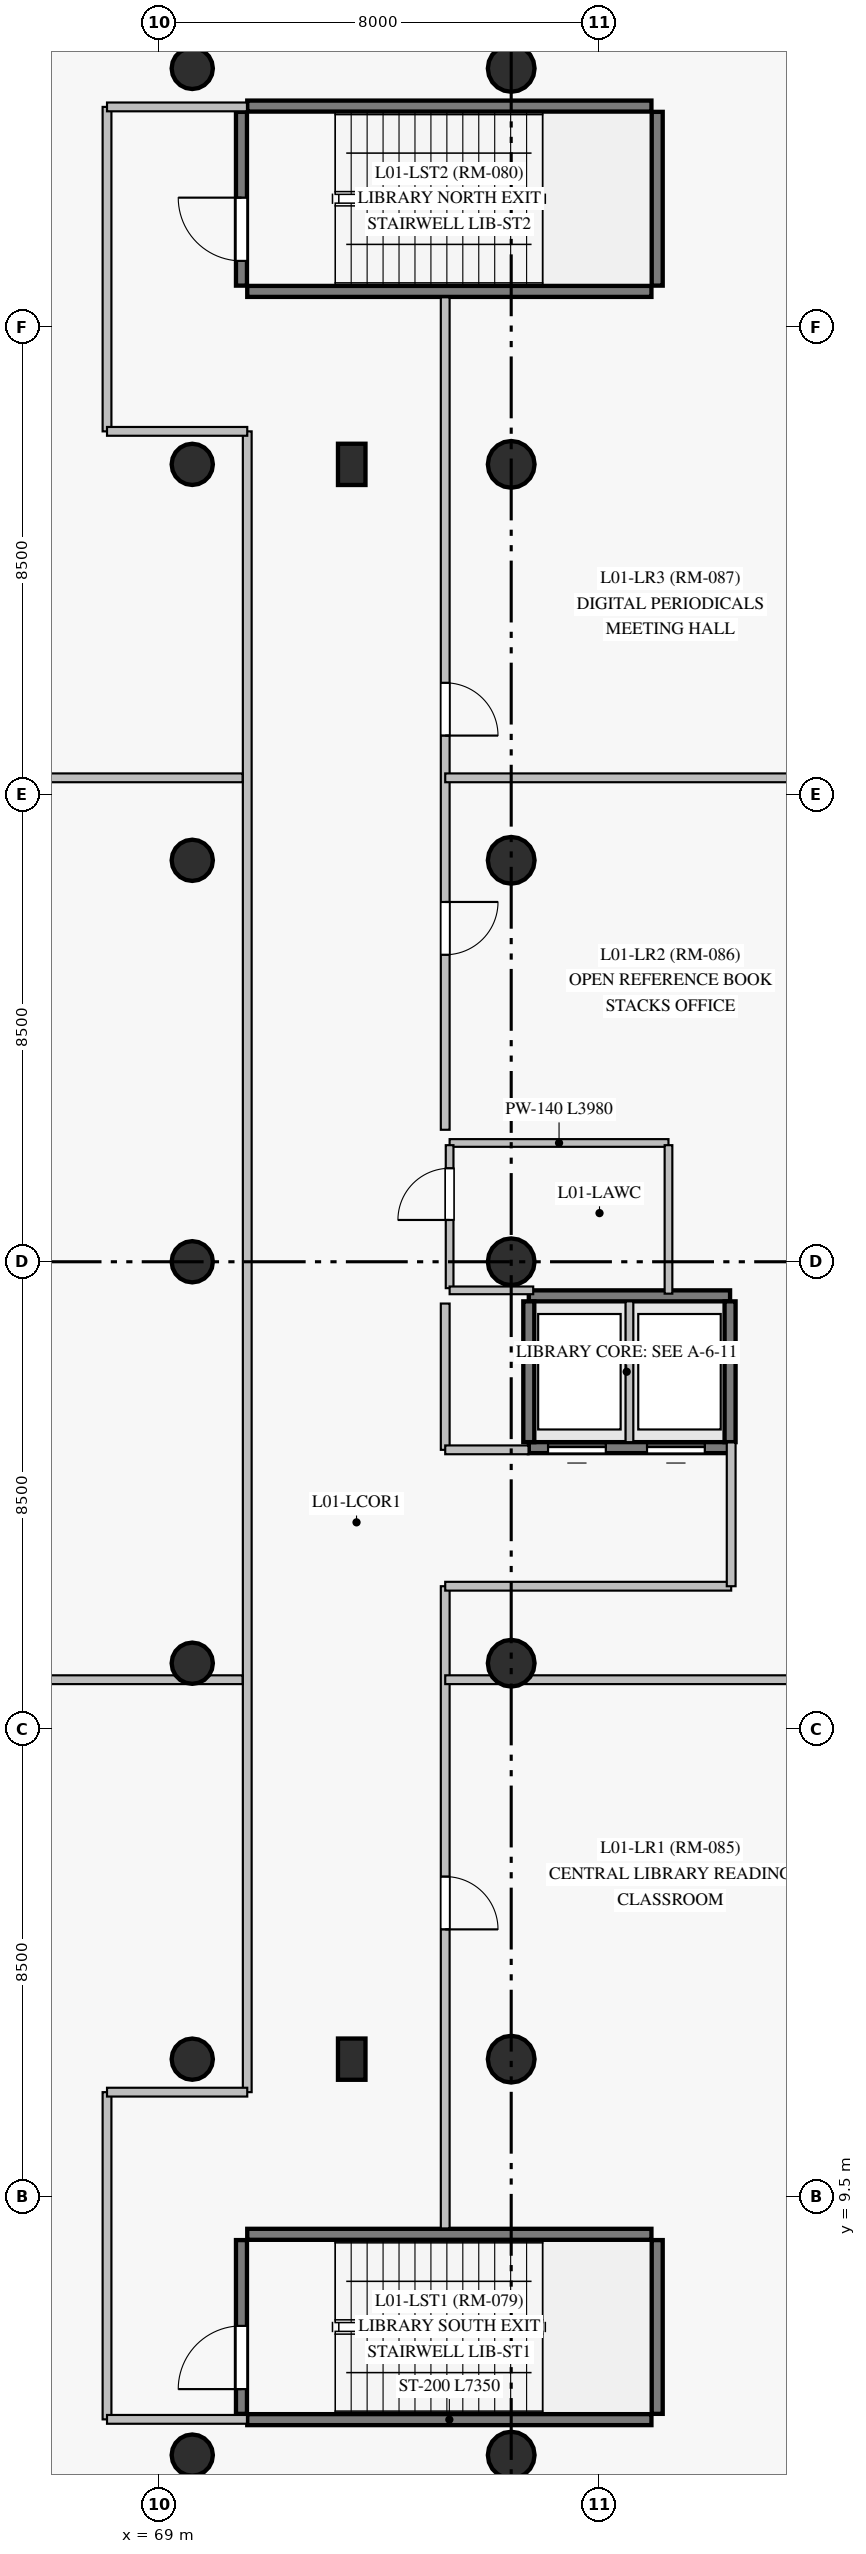
"""IFC4 building model, lengths in metres.
Left out: names, types, materials, properties, quantities, classifications, styles, units other than length and angle.
Written with IfcOpenShell. Run it as: python <this file> out.ifc"""

import sys

from ifc_helpers import new_model, si_unit, direction, frame, frame_2d, origin, origin_with_axes, origin_2d, place, context, subcontext, project, spatial, rectangle, circle, extrude, source, transform, mapped, element, fill, save


model = new_model("IFC4")
c1 = context("Model", 3, precision=1e-05, world=origin(), true_north=direction((0.0, 1.0)))
c2 = subcontext(c1, "Body", "Model", "MODEL_VIEW")
j1 = project(units=[si_unit("LENGTHUNIT", "METRE"), si_unit("PLANEANGLEUNIT", "RADIAN")], contexts=[c1])
p1 = place(None, origin())
s1 = spatial("IfcSite", under=j1, at=p1, CompositionType="ELEMENT")
p2 = place(p1, origin())
s2 = spatial("IfcBuilding", under=s1, at=p2, CompositionType="ELEMENT")
p3 = place(p2, frame((0.0, 0.0, 4.5)))
s3 = spatial("IfcBuildingStorey", under=s2, at=p3, CompositionType="ELEMENT", Elevation=4.5)
m1 = source(origin_with_axes(), c2, "Body", "SweptSolid", [
    extrude(circle(Radius=0.375, at=origin_2d()), origin(), (0.0, 0.0, 1.0), 4.5),
])
for number, where, z_axis, x_axis in (
    (1, (69.6, 4.8, 0.0), (0.0, 0.0, 1.0), (1.0, 0.0, 0.0)),
    (2, (69.6, 12.0, 0.0), (0.0, 0.0, 1.0), (1.0, 0.0, 0.0)),
    (3, (69.6, 19.2, 0.0), (0.0, 0.0, 1.0), (1.0, 0.0, 0.0)),
    (4, (69.6, 26.5, 0.0), (0.0, 0.0, 1.0), (1.0, 0.0, 0.0)),
    (5, (69.6, 33.8, 0.0), (0.0, 0.0, 1.0), (1.0, 0.0, 0.0)),
    (6, (69.6, 41.0, 0.0), (0.0, 0.0, 1.0), (1.0, 0.0, 0.0)),
    (7, (69.6, 48.2, 0.0), (0.0, 0.0, 1.0), (1.0, 0.0, 0.0)),
):
    element("IfcColumn", number, at=place(p3, frame(where, z_axis=z_axis, x_axis=x_axis)), inside=s3, PredefinedType="COLUMN", context=c2, shape_type="MappedRepresentation", body=[
        mapped(m1, transform((0.0, 0.0, 0.0), scale=1.0)),
    ])
m2 = source(origin_with_axes(), c2, "Body", "SweptSolid", [
    extrude(circle(Radius=0.425, at=origin_2d()), origin(), (0.0, 0.0, 1.0), 4.5),
])
for number, where, z_axis, x_axis in (
    (8, (75.4, 4.8, 0.0), (0.0, 0.0, 1.0), (1.0, 0.0, 0.0)),
    (9, (75.4, 12.0, 0.0), (0.0, 0.0, 1.0), (1.0, 0.0, 0.0)),
    (10, (75.4, 19.2, 0.0), (0.0, 0.0, 1.0), (1.0, 0.0, 0.0)),
    (11, (75.4, 26.5, 0.0), (0.0, 0.0, 1.0), (1.0, 0.0, 0.0)),
    (12, (75.4, 33.8, 0.0), (0.0, 0.0, 1.0), (1.0, 0.0, 0.0)),
    (13, (75.4, 41.0, 0.0), (0.0, 0.0, 1.0), (1.0, 0.0, 0.0)),
    (14, (75.4, 48.2, 0.0), (0.0, 0.0, 1.0), (1.0, 0.0, 0.0)),
):
    element("IfcColumn", number, at=place(p3, frame(where, z_axis=z_axis, x_axis=x_axis)), inside=s3, PredefinedType="COLUMN", context=c2, shape_type="MappedRepresentation", body=[
        mapped(m2, transform((0.0, 0.0, 0.0), scale=1.0)),
    ])
m3 = source(origin_with_axes(), c2, "Body", "SweptSolid", [
    extrude(rectangle(XDim=0.5, YDim=0.75, at=origin_2d()), origin(), (0.0, 0.0, 1.0), 4.5),
])
for number, where, z_axis, x_axis in (
    (15, (72.5, 12.0, 0.0), (0.0, 0.0, 1.0), (1.0, 0.0, 0.0)),
    (16, (72.5, 41.0, 0.0), (0.0, 0.0, 1.0), (1.0, 0.0, 0.0)),
):
    element("IfcColumn", number, at=place(p3, frame(where, z_axis=z_axis, x_axis=x_axis)), inside=s3, PredefinedType="PILASTER", context=c2, shape_type="MappedRepresentation", body=[
        mapped(m3, transform((0.0, 0.0, 0.0), scale=1.0)),
    ])
for number, where, z_axis, x_axis in (
    (17, (70.6, 5.445, 0.0), (0.0, 0.0, 1.0), (1.0, 0.0, 0.0)),
    (18, (70.6, 8.815, 0.0), (0.0, 0.0, 1.0), (1.0, 0.0, 0.0)),
    (19, (70.6, 44.145, 0.0), (0.0, 0.0, 1.0), (1.0, 0.0, 0.0)),
    (20, (70.6, 47.515, 0.0), (0.0, 0.0, 1.0), (1.0, 0.0, 0.0)),
):
    element("IfcWall", number, at=place(p3, frame(where, z_axis=z_axis, x_axis=x_axis)), inside=s3, PredefinedType="SHEAR", context=c2, shape_type="SweptSolid", body=[
        extrude(rectangle(XDim=7.35, YDim=0.2, at=frame_2d((3.675, 0.0))), origin(), (0.0, 0.0, 1.0), 4.2),
    ])
p4 = place(p3, frame((75.72, 23.12, 0.0), z_axis=(0.0, 0.0, 1.0), x_axis=(1.0, 0.0, 0.0)))
e21 = element("IfcWall", 21, at=p4, inside=s3, PredefinedType="SHEAR", context=c2, shape_type="SweptSolid", body=[
    extrude(rectangle(XDim=3.66, YDim=0.2, at=frame_2d((1.83, 0.0))), origin(), (0.0, 0.0, 1.0), 4.2),
])
p5 = place(p4, frame((0.35, 0.0, 0.0)))
e22 = element("IfcOpeningElement", 22, at=p5, cuts=e21, PredefinedType="OPENING", context=c2, shape_type="SweptSolid", body=[
    extrude(rectangle(XDim=1.05, YDim=2.15, at=frame_2d((0.525, 1.075))), frame((0.0, 0.11, 0.0), z_axis=(0.0, -1.0, 0.0), x_axis=(1.0, 0.0, 0.0)), (0.0, 0.0, 1.0), 0.22),
])
p6 = place(p4, frame((2.15, 0.0, 0.0)))
e23 = element("IfcOpeningElement", 23, at=p6, cuts=e21, PredefinedType="OPENING", context=c2, shape_type="SweptSolid", body=[
    extrude(rectangle(XDim=1.05, YDim=2.15, at=frame_2d((0.525, 1.075))), frame((0.0, 0.11, 0.0), z_axis=(0.0, -1.0, 0.0), x_axis=(1.0, 0.0, 0.0)), (0.0, 0.0, 1.0), 0.22),
])
p7 = place(p3, frame((75.72, 25.88, 0.0), z_axis=(0.0, 0.0, 1.0), x_axis=(1.0, 0.0, 0.0)))
e24 = element("IfcWall", 24, at=p7, inside=s3, PredefinedType="SHEAR", context=c2, shape_type="SweptSolid", body=[
    extrude(rectangle(XDim=3.66, YDim=0.2, at=frame_2d((1.83, 0.0))), origin(), (0.0, 0.0, 1.0), 4.2),
])
p8 = place(p3, frame((70.495, 5.55, 0.0), z_axis=(0.0, 0.0, 1.0), x_axis=(0.0, 1.0, 0.0)))
e25 = element("IfcWall", 25, at=p8, inside=s3, PredefinedType="SHEAR", context=c2, shape_type="SweptSolid", body=[
    extrude(rectangle(XDim=3.16, YDim=0.2, at=frame_2d((1.58, 0.0))), origin(), (0.0, 0.0, 1.0), 4.2),
])
p9 = place(p8, frame((0.45, 0.0, 0.0)))
e26 = element("IfcOpeningElement", 26, at=p9, cuts=e25, PredefinedType="OPENING", context=c2, shape_type="SweptSolid", body=[
    extrude(rectangle(XDim=1.15, YDim=2.15, at=frame_2d((0.575, 1.075))), frame((0.0, 0.11, 0.0), z_axis=(0.0, -1.0, 0.0), x_axis=(1.0, 0.0, 0.0)), (0.0, 0.0, 1.0), 0.22),
])
p10 = place(p3, frame((78.055, 5.55, 0.0), z_axis=(0.0, 0.0, 1.0), x_axis=(0.0, 1.0, 0.0)))
e27 = element("IfcWall", 27, at=p10, inside=s3, PredefinedType="SHEAR", context=c2, shape_type="SweptSolid", body=[
    extrude(rectangle(XDim=3.16, YDim=0.2, at=frame_2d((1.58, 0.0))), origin(), (0.0, 0.0, 1.0), 4.2),
])
p11 = place(p3, frame((70.495, 44.25, 0.0), z_axis=(0.0, 0.0, 1.0), x_axis=(0.0, 1.0, 0.0)))
e28 = element("IfcWall", 28, at=p11, inside=s3, PredefinedType="SHEAR", context=c2, shape_type="SweptSolid", body=[
    extrude(rectangle(XDim=3.16, YDim=0.2, at=frame_2d((1.58, 0.0))), origin(), (0.0, 0.0, 1.0), 4.2),
])
p12 = place(p11, frame((0.45, 0.0, 0.0)))
e29 = element("IfcOpeningElement", 29, at=p12, cuts=e28, PredefinedType="OPENING", context=c2, shape_type="SweptSolid", body=[
    extrude(rectangle(XDim=1.15, YDim=2.15, at=frame_2d((0.575, 1.075))), frame((0.0, 0.11, 0.0), z_axis=(0.0, -1.0, 0.0), x_axis=(1.0, 0.0, 0.0)), (0.0, 0.0, 1.0), 0.22),
])
p13 = place(p3, frame((78.055, 44.25, 0.0), z_axis=(0.0, 0.0, 1.0), x_axis=(0.0, 1.0, 0.0)))
e30 = element("IfcWall", 30, at=p13, inside=s3, PredefinedType="SHEAR", context=c2, shape_type="SweptSolid", body=[
    extrude(rectangle(XDim=3.16, YDim=0.2, at=frame_2d((1.58, 0.0))), origin(), (0.0, 0.0, 1.0), 4.2),
])
for number, where, z_axis, x_axis in (
    (31, (75.72, 23.22, 0.0), (0.0, 0.0, 1.0), (0.0, 1.0, 0.0)),
    (32, (79.38, 23.22, 0.0), (0.0, 0.0, 1.0), (0.0, 1.0, 0.0)),
):
    element("IfcWall", number, at=place(p3, frame(where, z_axis=z_axis, x_axis=x_axis)), inside=s3, PredefinedType="SHEAR", context=c2, shape_type="SweptSolid", body=[
        extrude(rectangle(XDim=2.56, YDim=0.2, at=frame_2d((1.28, 0.0))), origin(), (0.0, 0.0, 1.0), 4.2),
    ])
p14 = place(p3, frame((70.6, 11.4, 0.0), z_axis=(0.0, 0.0, 1.0), x_axis=(0.0, 1.0, 0.0)))
e33 = element("IfcWall", 33, at=p14, inside=s3, PredefinedType="PARTITIONING", context=c2, shape_type="SweptSolid", body=[
    extrude(rectangle(XDim=30.2, YDim=0.16, at=frame_2d((15.1, 0.0))), origin(), (0.0, 0.0, 1.0), 4.2),
])
p15 = place(p3, frame((74.2, 44.038, 0.0), z_axis=(0.0, 0.0, 1.0), x_axis=(0.0, -1.0, 0.0)))
e34 = element("IfcWall", 34, at=p15, inside=s3, PredefinedType="PARTITIONING", context=c2, shape_type="SweptSolid", body=[
    extrude(rectangle(XDim=15.138, YDim=0.16, at=frame_2d((7.569, 0.0))), origin(), (0.0, 0.0, 1.0), 4.2),
])
p16 = place(p15, frame((10.996, 0.0, 0.0)))
e35 = element("IfcOpeningElement", 35, at=p16, cuts=e34, PredefinedType="OPENING", context=c2, shape_type="SweptSolid", body=[
    extrude(rectangle(XDim=0.96, YDim=2.15, at=frame_2d((0.48, 1.075))), frame((0.0, 0.09, 0.0), z_axis=(0.0, -1.0, 0.0), x_axis=(1.0, 0.0, 0.0)), (0.0, 0.0, 1.0), 0.18),
])
p17 = place(p15, frame((7.01, 0.0, 0.0)))
e36 = element("IfcOpeningElement", 36, at=p17, cuts=e34, PredefinedType="OPENING", context=c2, shape_type="SweptSolid", body=[
    extrude(rectangle(XDim=0.96, YDim=2.15, at=frame_2d((0.48, 1.075))), frame((0.0, 0.09, 0.0), z_axis=(0.0, -1.0, 0.0), x_axis=(1.0, 0.0, 0.0)), (0.0, 0.0, 1.0), 0.18),
])
p18 = place(p3, frame((74.2, 20.6, 0.0), z_axis=(0.0, 0.0, 1.0), x_axis=(0.0, -1.0, 0.0)))
e37 = element("IfcWall", 37, at=p18, inside=s3, PredefinedType="PARTITIONING", context=c2, shape_type="SweptSolid", body=[
    extrude(rectangle(XDim=11.678, YDim=0.16, at=frame_2d((5.839, 0.0))), origin(), (0.0, 0.0, 1.0), 4.2),
])
p19 = place(p18, frame((5.28, 0.0, 0.0)))
e38 = element("IfcOpeningElement", 38, at=p19, cuts=e37, PredefinedType="OPENING", context=c2, shape_type="SweptSolid", body=[
    extrude(rectangle(XDim=0.96, YDim=2.15, at=frame_2d((0.48, 1.075))), frame((0.0, 0.09, 0.0), z_axis=(0.0, -1.0, 0.0), x_axis=(1.0, 0.0, 0.0)), (0.0, 0.0, 1.0), 0.18),
])
p20 = place(p3, frame((74.2, 18.9, 0.0), z_axis=(0.0, 0.0, 1.0), x_axis=(1.0, 0.0, 0.0)))
e39 = element("IfcWall", 39, at=p20, inside=s3, PredefinedType="PARTITIONING", context=c2, shape_type="SweptSolid", body=[
    extrude(rectangle(XDim=7.545, YDim=0.16, at=frame_2d((3.772, 0.0))), origin(), (0.0, 0.0, 1.0), 3.55),
])
p21 = place(p3, frame((74.2, 35.3, 0.0), z_axis=(0.0, 0.0, 1.0), x_axis=(1.0, 0.0, 0.0)))
e40 = element("IfcWall", 40, at=p21, inside=s3, PredefinedType="PARTITIONING", context=c2, shape_type="SweptSolid", body=[
    extrude(rectangle(XDim=7.545, YDim=0.16, at=frame_2d((3.772, 0.0))), origin(), (0.0, 0.0, 1.0), 4.2),
])
p22 = place(p3, frame((68.05, 5.45, 0.0), z_axis=(0.0, 0.0, 1.0), x_axis=(0.0, 1.0, 0.0)))
e41 = element("IfcWall", 41, at=p22, inside=s3, PredefinedType="PARTITIONING", context=c2, shape_type="SweptSolid", body=[
    extrude(rectangle(XDim=5.95, YDim=0.16, at=frame_2d((2.975, 0.0))), origin(), (0.0, 0.0, 1.0), 4.2),
])
p23 = place(p3, frame((68.05, 41.6, 0.0), z_axis=(0.0, 0.0, 1.0), x_axis=(0.0, 1.0, 0.0)))
e42 = element("IfcWall", 42, at=p23, inside=s3, PredefinedType="PARTITIONING", context=c2, shape_type="SweptSolid", body=[
    extrude(rectangle(XDim=5.9, YDim=0.16, at=frame_2d((2.95, 0.0))), origin(), (0.0, 0.0, 1.0), 4.2),
])
p24 = place(p3, frame((79.4, 20.6, 0.0), z_axis=(0.0, 0.0, 1.0), x_axis=(-1.0, 0.0, 0.0)))
e43 = element("IfcWall", 43, at=p24, inside=s3, PredefinedType="PARTITIONING", context=c2, shape_type="SweptSolid", body=[
    extrude(rectangle(XDim=5.2, YDim=0.16, at=frame_2d((2.6, 0.0))), origin(), (0.0, 0.0, 1.0), 4.2),
])
p25 = place(p3, frame((66.355, 18.9, 0.0), z_axis=(0.0, 0.0, 1.0), x_axis=(1.0, 0.0, 0.0)))
e44 = element("IfcWall", 44, at=p25, inside=s3, PredefinedType="PARTITIONING", context=c2, shape_type="SweptSolid", body=[
    extrude(rectangle(XDim=4.16, YDim=0.16, at=frame_2d((2.08, 0.0))), origin(), (0.0, 0.0, 1.0), 3.55),
])
p26 = place(p3, frame((66.355, 35.3, 0.0), z_axis=(0.0, 0.0, 1.0), x_axis=(1.0, 0.0, 0.0)))
e45 = element("IfcWall", 45, at=p26, inside=s3, PredefinedType="PARTITIONING", context=c2, shape_type="SweptSolid", body=[
    extrude(rectangle(XDim=4.16, YDim=0.16, at=frame_2d((2.08, 0.0))), origin(), (0.0, 0.0, 1.0), 4.2),
])
p27 = place(p3, frame((74.28, 28.66, 0.0), z_axis=(0.0, 0.0, 1.0), x_axis=(1.0, 0.0, 0.0)))
e46 = element("IfcWall", 46, at=p27, inside=s3, PredefinedType="PARTITIONING", context=c2, shape_type="SweptSolid", body=[
    extrude(rectangle(XDim=3.98, YDim=0.14, at=frame_2d((1.99, 0.0))), origin(), (0.0, 0.0, 1.0), 4.2),
])
p28 = place(p3, frame((78.26, 25.92, 0.0), z_axis=(0.0, 0.0, 1.0), x_axis=(0.0, 1.0, 0.0)))
e47 = element("IfcWall", 47, at=p28, inside=s3, PredefinedType="PARTITIONING", context=c2, shape_type="SweptSolid", body=[
    extrude(rectangle(XDim=2.7, YDim=0.14, at=frame_2d((1.35, 0.0))), origin(), (0.0, 0.0, 1.0), 4.2),
])
p29 = place(p3, frame((74.2, 25.74, 0.0), z_axis=(0.0, 0.0, 1.0), x_axis=(0.0, -1.0, 0.0)))
e48 = element("IfcWall", 48, at=p29, inside=s3, PredefinedType="PARTITIONING", context=c2, shape_type="SweptSolid", body=[
    extrude(rectangle(XDim=2.66, YDim=0.16, at=frame_2d((1.33, 0.0))), origin(), (0.0, 0.0, 1.0), 4.2),
])
p30 = place(p3, frame((74.28, 26.02, 0.0), z_axis=(0.0, 0.0, 1.0), x_axis=(0.0, 1.0, 0.0)))
e49 = element("IfcWall", 49, at=p30, inside=s3, PredefinedType="PARTITIONING", context=c2, shape_type="SweptSolid", body=[
    extrude(rectangle(XDim=2.6, YDim=0.14, at=frame_2d((1.3, 0.0))), origin(), (0.0, 0.0, 1.0), 4.2),
])
p31 = place(p30, frame((1.24, 0.0, 0.0)))
e50 = element("IfcOpeningElement", 50, at=p31, cuts=e49, PredefinedType="OPENING", context=c2, shape_type="SweptSolid", body=[
    extrude(rectangle(XDim=0.94, YDim=2.1, at=frame_2d((0.47, 1.05))), frame((0.0, 0.08, 0.0), z_axis=(0.0, -1.0, 0.0), x_axis=(1.0, 0.0, 0.0)), (0.0, 0.0, 1.0), 0.16),
])
p32 = place(p3, frame((77.55, 23.22, 0.0), z_axis=(0.0, 0.0, 1.0), x_axis=(0.0, 1.0, 0.0)))
e51 = element("IfcWall", 51, at=p32, inside=s3, PredefinedType="PARTITIONING", context=c2, shape_type="SweptSolid", body=[
    extrude(rectangle(XDim=2.56, YDim=0.14, at=frame_2d((1.28, 0.0))), origin(), (0.0, 0.0, 1.0), 4.2),
])
for number, where, z_axis, x_axis in (
    (52, (70.6, 41.6, 0.0), (0.0, 0.0, 1.0), (-1.0, 0.0, 0.0)),
    (53, (68.05, 11.4, 0.0), (0.0, 0.0, 1.0), (1.0, 0.0, 0.0)),
):
    element("IfcWall", number, at=place(p3, frame(where, z_axis=z_axis, x_axis=x_axis)), inside=s3, PredefinedType="PARTITIONING", context=c2, shape_type="SweptSolid", body=[
        extrude(rectangle(XDim=2.55, YDim=0.16, at=frame_2d((1.275, 0.0))), origin(), (0.0, 0.0, 1.0), 3.55),
    ])
p33 = place(p3, frame((79.4, 23.215, 0.0), z_axis=(0.0, 0.0, 1.0), x_axis=(0.0, -1.0, 0.0)))
e54 = element("IfcWall", 54, at=p33, inside=s3, PredefinedType="PARTITIONING", context=c2, shape_type="SweptSolid", body=[
    extrude(rectangle(XDim=2.615, YDim=0.16, at=frame_2d((1.308, 0.0))), origin(), (0.0, 0.0, 1.0), 4.2),
])
p34 = place(p3, frame((68.05, 47.5, 0.0), z_axis=(0.0, 0.0, 1.0), x_axis=(1.0, 0.0, 0.0)))
e55 = element("IfcWall", 55, at=p34, inside=s3, PredefinedType="PARTITIONING", context=c2, shape_type="SweptSolid", body=[
    extrude(rectangle(XDim=2.545, YDim=0.16, at=frame_2d((1.272, 0.0))), origin(), (0.0, 0.0, 1.0), 4.2),
])
p35 = place(p3, frame((70.595, 5.45, 0.0), z_axis=(0.0, 0.0, 1.0), x_axis=(-1.0, 0.0, 0.0)))
e56 = element("IfcWall", 56, at=p35, inside=s3, PredefinedType="PARTITIONING", context=c2, shape_type="SweptSolid", body=[
    extrude(rectangle(XDim=2.545, YDim=0.16, at=frame_2d((1.272, 0.0))), origin(), (0.0, 0.0, 1.0), 3.55),
])
p36 = place(p3, frame((74.28, 25.98, 0.0), z_axis=(0.0, 0.0, 1.0), x_axis=(1.0, 0.0, 0.0)))
e57 = element("IfcWall", 57, at=p36, inside=s3, PredefinedType="PARTITIONING", context=c2, shape_type="SweptSolid", body=[
    extrude(rectangle(XDim=1.52, YDim=0.14, at=frame_2d((0.76, 0.0))), origin(), (0.0, 0.0, 1.0), 3.55),
])
p37 = place(p3, frame((74.2, 23.08, 0.0), z_axis=(0.0, 0.0, 1.0), x_axis=(1.0, 0.0, 0.0)))
e58 = element("IfcWall", 58, at=p37, inside=s3, PredefinedType="PARTITIONING", context=c2, shape_type="SweptSolid", body=[
    extrude(rectangle(XDim=1.515, YDim=0.16, at=frame_2d((0.758, 0.0))), origin(), (0.0, 0.0, 1.0), 3.7),
])
m4 = source(origin_with_axes(), c2, "Body", "SweptSolid", [
    extrude(rectangle(XDim=1.15, YDim=2.15, at=frame_2d((0.575, 1.075))), frame((0.0, 0.025, 0.0), z_axis=(0.0, -1.0, 0.0), x_axis=(1.0, 0.0, 0.0)), (0.0, 0.0, 1.0), 0.05),
])
p38 = place(p9, origin())
e59 = element("IfcDoor", 59, at=p38, inside=s3, OperationType="SINGLE_SWING_LEFT", PredefinedType="DOOR", context=c2, shape_type="MappedRepresentation", body=[
    mapped(m4, transform((0.0, 0.0, 0.0), scale=1.0)),
])
fill(e26, e59)
p39 = place(p12, origin())
e60 = element("IfcDoor", 60, at=p39, inside=s3, OperationType="SINGLE_SWING_RIGHT", PredefinedType="DOOR", context=c2, shape_type="MappedRepresentation", body=[
    mapped(m4, transform((0.0, 0.0, 0.0), scale=1.0)),
])
fill(e29, e60)
m5 = source(origin_with_axes(), c2, "Body", "SweptSolid", [
    extrude(rectangle(XDim=1.05, YDim=2.15, at=frame_2d((0.525, 1.075))), frame((0.0, 0.025, 0.0), z_axis=(0.0, -1.0, 0.0), x_axis=(1.0, 0.0, 0.0)), (0.0, 0.0, 1.0), 0.05),
])
p40 = place(p5, origin())
e61 = element("IfcDoor", 61, at=p40, inside=s3, OperationType="SLIDING_TO_LEFT", PredefinedType="DOOR", context=c2, shape_type="MappedRepresentation", body=[
    mapped(m5, transform((0.0, 0.0, 0.0), scale=1.0)),
])
fill(e22, e61)
p41 = place(p6, origin())
e62 = element("IfcDoor", 62, at=p41, inside=s3, OperationType="SLIDING_TO_RIGHT", PredefinedType="DOOR", context=c2, shape_type="MappedRepresentation", body=[
    mapped(m5, transform((0.0, 0.0, 0.0), scale=1.0)),
])
fill(e23, e62)
m6 = source(origin_with_axes(), c2, "Body", "SweptSolid", [
    extrude(rectangle(XDim=0.94, YDim=2.1, at=frame_2d((0.47, 1.05))), frame((0.0, 0.025, 0.0), z_axis=(0.0, -1.0, 0.0), x_axis=(1.0, 0.0, 0.0)), (0.0, 0.0, 1.0), 0.05),
])
p42 = place(p31, origin())
e63 = element("IfcDoor", 63, at=p42, inside=s3, OperationType="SINGLE_SWING_LEFT", PredefinedType="DOOR", context=c2, shape_type="MappedRepresentation", body=[
    mapped(m6, transform((0.0, 0.0, 0.0), scale=1.0)),
])
fill(e50, e63)
m7 = source(origin_with_axes(), c2, "Body", "SweptSolid", [
    extrude(rectangle(XDim=0.96, YDim=2.15, at=frame_2d((0.48, 1.075))), frame((0.0, 0.025, 0.0), z_axis=(0.0, -1.0, 0.0), x_axis=(1.0, 0.0, 0.0)), (0.0, 0.0, 1.0), 0.05),
])
p43 = place(p19, origin())
e64 = element("IfcDoor", 64, at=p43, inside=s3, OperationType="SINGLE_SWING_RIGHT", PredefinedType="DOOR", context=c2, shape_type="MappedRepresentation", body=[
    mapped(m7, transform((0.0, 0.0, 0.0), scale=1.0)),
])
fill(e38, e64)
p44 = place(p16, origin())
e65 = element("IfcDoor", 65, at=p44, inside=s3, OperationType="SINGLE_SWING_LEFT", PredefinedType="DOOR", context=c2, shape_type="MappedRepresentation", body=[
    mapped(m7, transform((0.0, 0.0, 0.0), scale=1.0)),
])
fill(e35, e65)
p45 = place(p17, origin())
e66 = element("IfcDoor", 66, at=p45, inside=s3, OperationType="SINGLE_SWING_RIGHT", PredefinedType="DOOR", context=c2, shape_type="MappedRepresentation", body=[
    mapped(m7, transform((0.0, 0.0, 0.0), scale=1.0)),
])
fill(e36, e66)
save(model, sys.argv[1])
